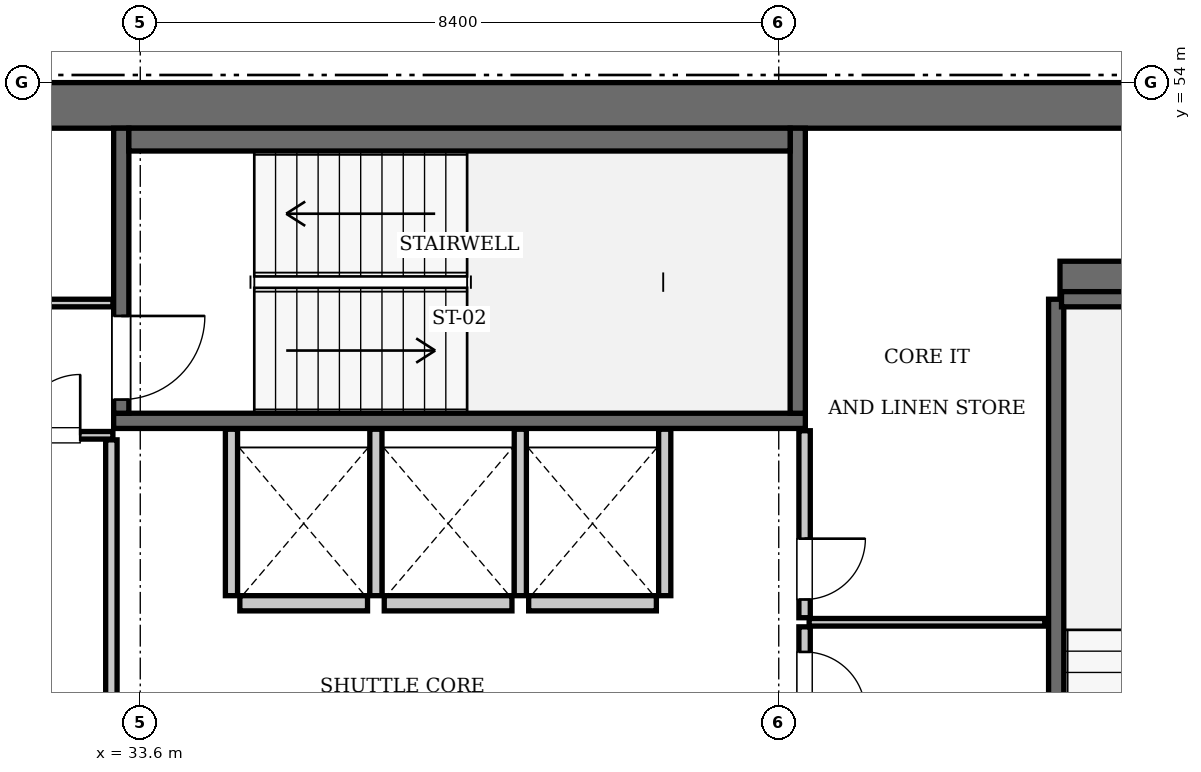
"""IFC4 building model, lengths in metres.
Left out: names, types, materials, properties, quantities, classifications, styles, units other than length and angle.
Written with IfcOpenShell. Run it as: python <this file> out.ifc"""

import sys

from ifc_helpers import new_model, si_unit, direction, frame, frame_2d, origin, place, context, subcontext, project, spatial, rectangle, extrude, element, fill, save


model = new_model("IFC4")
c1 = context("Model", 3, precision=1e-05, world=origin(), true_north=direction((0.0, 1.0)))
c2 = subcontext(c1, "Body", "Model", "MODEL_VIEW")
j1 = project(units=[si_unit("LENGTHUNIT", "METRE"), si_unit("PLANEANGLEUNIT", "RADIAN")], contexts=[c1])
p1 = place(None, origin())
s1 = spatial("IfcSite", under=j1, at=p1, CompositionType="ELEMENT")
p2 = place(p1, origin())
s2 = spatial("IfcBuilding", under=s1, at=p2, CompositionType="ELEMENT")
p3 = place(p2, frame((0.0, 0.0, 274.05)))
s3 = spatial("IfcBuildingStorey", under=s2, at=p3, CompositionType="ELEMENT", Elevation=274.05)
p4 = place(p3, frame((25.2, 53.7, 0.0), z_axis=(0.0, 0.0, 1.0), x_axis=(1.0, 0.0, 0.0)))
e1 = element("IfcWall", 1, at=p4, inside=s3, PredefinedType="SHEAR", context=c2, shape_type="SweptSolid", body=[
    extrude(rectangle(XDim=25.2, YDim=0.6, at=frame_2d((12.6, 0.0))), origin(), (0.0, 0.0, 1.0), 3.85),
])
p5 = place(p3, frame((45.7, 51.4, 0.0), z_axis=(0.0, 0.0, 1.0), x_axis=(1.0, 0.0, 0.0)))
e2 = element("IfcWall", 2, at=p5, inside=s3, PredefinedType="SHEAR", context=c2, shape_type="SweptSolid", body=[
    extrude(rectangle(XDim=4.1, YDim=0.5, at=frame_2d((2.05, 0.0))), origin(), (0.0, 0.0, 1.0), 3.85),
])
p6 = place(p3, frame((33.25, 49.55, 0.0), z_axis=(0.0, 0.0, 1.0), x_axis=(1.0, 0.0, 0.0)))
e3 = element("IfcWall", 3, at=p6, inside=s3, PredefinedType="SOLIDWALL", context=c2, shape_type="SweptSolid", body=[
    extrude(rectangle(XDim=9.1, YDim=0.2, at=frame_2d((4.55, 0.0))), origin(), (0.0, 0.0, 1.0), 3.61),
])
p7 = place(p3, frame((42.25, 49.65, 0.0), z_axis=(0.0, 0.0, 1.0), x_axis=(0.0, 1.0, 0.0)))
e4 = element("IfcWall", 4, at=p7, inside=s3, PredefinedType="SOLIDWALL", context=c2, shape_type="SweptSolid", body=[
    extrude(rectangle(XDim=3.75, YDim=0.2, at=frame_2d((1.875, 0.0))), origin(), (0.0, 0.0, 1.0), 3.61),
])
p8 = place(p3, frame((33.35, 49.65, 0.0), z_axis=(0.0, 0.0, 1.0), x_axis=(0.0, 1.0, 0.0)))
e5 = element("IfcWall", 5, at=p8, inside=s3, PredefinedType="SOLIDWALL", context=c2, shape_type="SweptSolid", body=[
    extrude(rectangle(XDim=3.75, YDim=0.2, at=frame_2d((1.875, 0.0))), origin(), (0.0, 0.0, 1.0), 3.61),
])
p9 = place(p8, frame((0.18, 0.0, 0.0)))
e6 = element("IfcOpeningElement", 6, at=p9, cuts=e5, PredefinedType="OPENING", context=c2, shape_type="SweptSolid", body=[
    extrude(rectangle(XDim=1.1, YDim=2.15, at=frame_2d((0.55, 1.075))), frame((0.0, 0.11, 0.0), z_axis=(0.0, -1.0, 0.0), x_axis=(1.0, 0.0, 0.0)), (0.0, 0.0, 1.0), 0.22),
])
p10 = place(p3, frame((33.45, 53.25, 0.0), z_axis=(0.0, 0.0, 1.0), x_axis=(1.0, 0.0, 0.0)))
e7 = element("IfcWall", 7, at=p10, inside=s3, PredefinedType="SOLIDWALL", context=c2, shape_type="SweptSolid", body=[
    extrude(rectangle(XDim=8.7, YDim=0.3, at=frame_2d((4.35, 0.0))), origin(), (0.0, 0.0, 1.0), 3.61),
])
p11 = place(p3, frame((45.65, 42.0, 0.0), z_axis=(0.0, 0.0, 1.0), x_axis=(0.0, 1.0, 0.0)))
e8 = element("IfcWall", 8, at=p11, inside=s3, PredefinedType="SOLIDWALL", context=c2, shape_type="SweptSolid", body=[
    extrude(rectangle(XDim=9.15, YDim=0.2, at=frame_2d((4.575, 0.0))), origin(), (0.0, 0.0, 1.0), 3.61),
])
p12 = place(p3, frame((45.72, 51.15, 0.0), z_axis=(0.0, 0.0, 1.0), x_axis=(1.0, 0.0, 0.0)))
e9 = element("IfcWall", 9, at=p12, inside=s3, PredefinedType="SOLIDWALL", context=c2, shape_type="SweptSolid", body=[
    extrude(rectangle(XDim=3.5, YDim=0.2, at=frame_2d((1.75, 0.0))), origin(), (0.0, 0.0, 1.0), 3.61),
])
p13 = place(p3, frame((34.91, 47.15, 0.0), z_axis=(0.0, 0.0, 1.0), x_axis=(1.0, 0.0, 0.0)))
e10 = element("IfcWall", 10, at=p13, inside=s3, PredefinedType="SOLIDWALL", context=c2, shape_type="SweptSolid", body=[
    extrude(rectangle(XDim=1.68, YDim=0.2, at=frame_2d((0.84, 0.0))), origin(), (0.0, 0.0, 1.0), 3.61),
])
for number, where, z_axis, x_axis in (
    (11, (36.81, 47.15, 0.0), (0.0, 0.0, 1.0), (1.0, 0.0, 0.0)),
    (12, (38.71, 47.15, 0.0), (0.0, 0.0, 1.0), (1.0, 0.0, 0.0)),
):
    element("IfcWall", number, at=place(p3, frame(where, z_axis=z_axis, x_axis=x_axis)), inside=s3, PredefinedType="SOLIDWALL", context=c2, shape_type="SweptSolid", body=[
        extrude(rectangle(XDim=1.68, YDim=0.2, at=frame_2d((0.84, 0.0))), origin(), (0.0, 0.0, 1.0), 3.61),
    ])
for number, where, z_axis, x_axis in (
    (13, (34.8, 47.25, 0.0), (0.0, 0.0, 1.0), (0.0, 1.0, 0.0)),
    (14, (36.7, 47.25, 0.0), (0.0, 0.0, 1.0), (0.0, 1.0, 0.0)),
    (15, (38.6, 47.25, 0.0), (0.0, 0.0, 1.0), (0.0, 1.0, 0.0)),
    (16, (40.5, 47.25, 0.0), (0.0, 0.0, 1.0), (0.0, 1.0, 0.0)),
):
    element("IfcWall", number, at=place(p3, frame(where, z_axis=z_axis, x_axis=x_axis)), inside=s3, PredefinedType="SOLIDWALL", context=c2, shape_type="SweptSolid", body=[
        extrude(rectangle(XDim=2.19, YDim=0.16, at=frame_2d((1.095, 0.0))), origin(), (0.0, 0.0, 1.0), 3.61),
    ])
p14 = place(p3, frame((33.22, 45.14, 0.0), z_axis=(0.0, 0.0, 1.0), x_axis=(0.0, 1.0, 0.0)))
e17 = element("IfcWall", 17, at=p14, inside=s3, PredefinedType="PARTITIONING", context=c2, shape_type="SweptSolid", body=[
    extrude(rectangle(XDim=4.16, YDim=0.15, at=frame_2d((2.08, 0.0))), origin(), (0.0, 0.0, 1.0), 3.61),
])
p15 = place(p3, frame((30.06, 49.36, 0.0), z_axis=(0.0, 0.0, 1.0), x_axis=(1.0, 0.0, 0.0)))
e18 = element("IfcWall", 18, at=p15, inside=s3, PredefinedType="PARTITIONING", context=c2, shape_type="SweptSolid", body=[
    extrude(rectangle(XDim=3.18, YDim=0.1, at=frame_2d((1.59, 0.0))), origin(), (0.0, 0.0, 1.0), 3.61),
])
p16 = place(p15, frame((1.95, 0.0, 0.0)))
e19 = element("IfcOpeningElement", 19, at=p16, cuts=e18, PredefinedType="OPENING", context=c2, shape_type="SweptSolid", body=[
    extrude(rectangle(XDim=0.8, YDim=2.05, at=frame_2d((0.4, 1.025))), frame((0.0, 0.06, 0.0), z_axis=(0.0, -1.0, 0.0), x_axis=(1.0, 0.0, 0.0)), (0.0, 0.0, 1.0), 0.12),
])
p17 = place(p3, frame((31.82, 51.1, 0.0), z_axis=(0.0, 0.0, 1.0), x_axis=(1.0, 0.0, 0.0)))
e20 = element("IfcWall", 20, at=p17, inside=s3, PredefinedType="PARTITIONING", context=c2, shape_type="SweptSolid", body=[
    extrude(rectangle(XDim=1.42, YDim=0.1, at=frame_2d((0.71, 0.0))), origin(), (0.0, 0.0, 1.0), 3.61),
])
p18 = place(p3, frame((42.34, 45.16, 0.0), z_axis=(0.0, 0.0, 1.0), x_axis=(0.0, 1.0, 0.0)))
e21 = element("IfcWall", 21, at=p18, inside=s3, PredefinedType="PARTITIONING", context=c2, shape_type="SweptSolid", body=[
    extrude(rectangle(XDim=1.68, YDim=0.15, at=frame_2d((0.84, 0.0))), origin(), (0.0, 0.0, 1.0), 3.61),
])
p19 = place(p18, frame((0.55, 0.0, 0.0)))
e22 = element("IfcOpeningElement", 22, at=p19, cuts=e21, PredefinedType="OPENING", context=c2, shape_type="SweptSolid", body=[
    extrude(rectangle(XDim=0.8, YDim=2.05, at=frame_2d((0.4, 1.025))), frame((0.0, 0.085, 0.0), z_axis=(0.0, -1.0, 0.0), x_axis=(1.0, 0.0, 0.0)), (0.0, 0.0, 1.0), 0.17),
])
p20 = place(p3, frame((42.34, 46.96, 0.0), z_axis=(0.0, 0.0, 1.0), x_axis=(0.0, 1.0, 0.0)))
e23 = element("IfcWall", 23, at=p20, inside=s3, PredefinedType="PARTITIONING", context=c2, shape_type="SweptSolid", body=[
    extrude(rectangle(XDim=2.46, YDim=0.15, at=frame_2d((1.23, 0.0))), origin(), (0.0, 0.0, 1.0), 3.61),
])
p21 = place(p20, frame((0.24, 0.0, 0.0)))
e24 = element("IfcOpeningElement", 24, at=p21, cuts=e23, PredefinedType="OPENING", context=c2, shape_type="SweptSolid", body=[
    extrude(rectangle(XDim=0.8, YDim=2.05, at=frame_2d((0.4, 1.025))), frame((0.0, 0.085, 0.0), z_axis=(0.0, -1.0, 0.0), x_axis=(1.0, 0.0, 0.0)), (0.0, 0.0, 1.0), 0.17),
])
p22 = place(p3, frame((42.4, 46.9, 0.0), z_axis=(0.0, 0.0, 1.0), x_axis=(1.0, 0.0, 0.0)))
e25 = element("IfcWall", 25, at=p22, inside=s3, PredefinedType="PARTITIONING", context=c2, shape_type="SweptSolid", body=[
    extrude(rectangle(XDim=3.1, YDim=0.1, at=frame_2d((1.55, 0.0))), origin(), (0.0, 0.0, 1.0), 3.61),
])
p23 = place(p9, frame((1.1, 0.0, 0.0), z_axis=(0.0, 0.0, 1.0), x_axis=(-1.0, 0.0, 0.0)))
e26 = element("IfcDoor", 26, at=p23, inside=s3, OperationType="SINGLE_SWING_LEFT", PredefinedType="DOOR", context=c2, shape_type="SweptSolid", body=[
    extrude(rectangle(XDim=1.1, YDim=2.15, at=frame_2d((0.55, 1.075))), frame((0.0, 0.025, 0.0), z_axis=(0.0, -1.0, 0.0), x_axis=(1.0, 0.0, 0.0)), (0.0, 0.0, 1.0), 0.05),
])
fill(e6, e26)
p24 = place(p16, origin())
e27 = element("IfcDoor", 27, at=p24, inside=s3, OperationType="SINGLE_SWING_RIGHT", PredefinedType="DOOR", context=c2, shape_type="SweptSolid", body=[
    extrude(rectangle(XDim=0.8, YDim=2.05, at=frame_2d((0.4, 1.025))), frame((0.0, 0.025, 0.0), z_axis=(0.0, -1.0, 0.0), x_axis=(1.0, 0.0, 0.0)), (0.0, 0.0, 1.0), 0.05),
])
fill(e19, e27)
p25 = place(p19, frame((0.8, 0.0, 0.0), z_axis=(0.0, 0.0, 1.0), x_axis=(-1.0, 0.0, 0.0)))
e28 = element("IfcDoor", 28, at=p25, inside=s3, OperationType="SINGLE_SWING_RIGHT", PredefinedType="DOOR", context=c2, shape_type="SweptSolid", body=[
    extrude(rectangle(XDim=0.8, YDim=2.05, at=frame_2d((0.4, 1.025))), frame((0.0, 0.025, 0.0), z_axis=(0.0, -1.0, 0.0), x_axis=(1.0, 0.0, 0.0)), (0.0, 0.0, 1.0), 0.05),
])
fill(e22, e28)
p26 = place(p21, frame((0.8, 0.0, 0.0), z_axis=(0.0, 0.0, 1.0), x_axis=(-1.0, 0.0, 0.0)))
e29 = element("IfcDoor", 29, at=p26, inside=s3, OperationType="SINGLE_SWING_LEFT", PredefinedType="DOOR", context=c2, shape_type="SweptSolid", body=[
    extrude(rectangle(XDim=0.8, YDim=2.05, at=frame_2d((0.4, 1.025))), frame((0.0, 0.025, 0.0), z_axis=(0.0, -1.0, 0.0), x_axis=(1.0, 0.0, 0.0)), (0.0, 0.0, 1.0), 0.05),
])
fill(e24, e29)
save(model, sys.argv[1])
